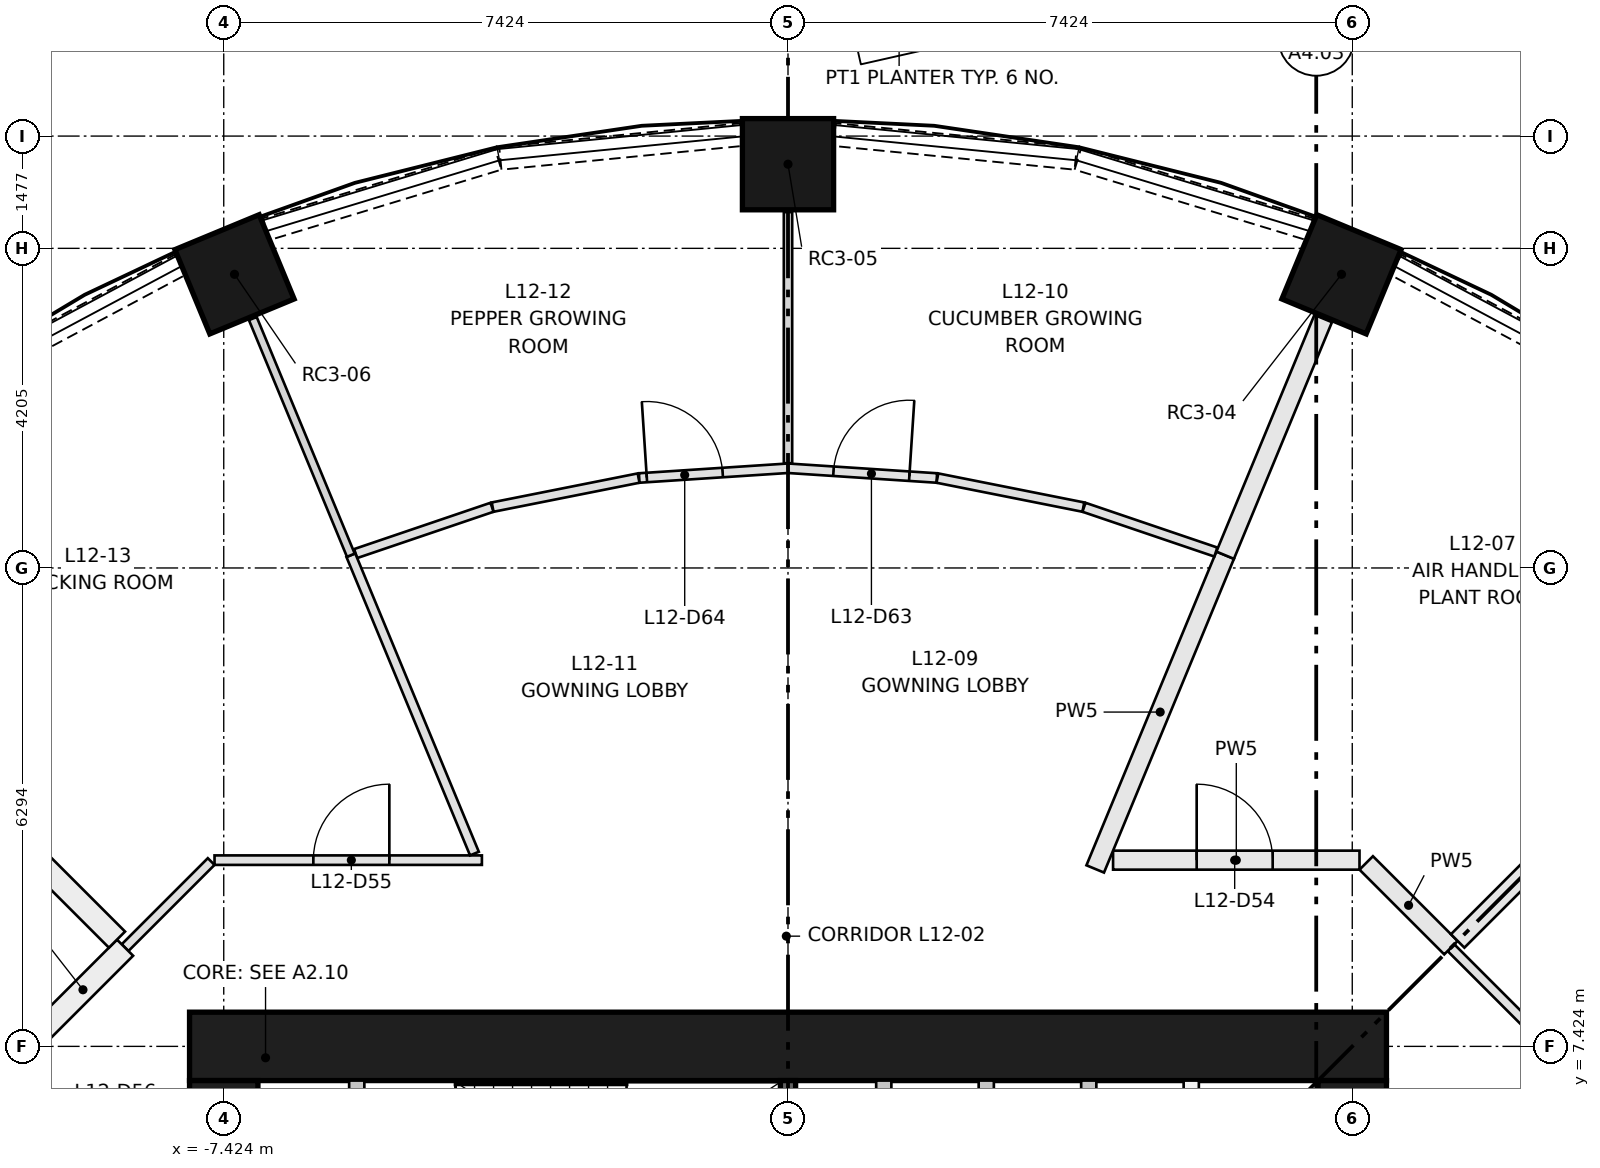
"""IFC4 building model, lengths in metres.
Left out: names, types, materials, properties, quantities, classifications, styles, units other than length and angle.
Written with IfcOpenShell. Run it as: python <this file> out.ifc"""

import sys

from ifc_helpers import new_model, si_unit, direction, frame, frame_2d, origin, origin_2d, place, context, subcontext, project, spatial, rectangle, extrude, element, fill, save


model = new_model("IFC4")
c1 = context("Model", 3, precision=1e-05, world=origin(), true_north=direction((0.0, 1.0)))
c2 = subcontext(c1, "Body", "Model", "MODEL_VIEW")
j1 = project(units=[si_unit("LENGTHUNIT", "METRE"), si_unit("PLANEANGLEUNIT", "RADIAN")], contexts=[c1])
p1 = place(None, origin())
s1 = spatial("IfcSite", under=j1, at=p1, CompositionType="ELEMENT")
p2 = place(p1, origin())
s2 = spatial("IfcBuilding", under=s1, at=p2, CompositionType="ELEMENT")
p3 = place(p2, frame((0.0, 0.0, 48.1)))
s3 = spatial("IfcBuildingStorey", under=s2, at=p3, CompositionType="ELEMENT", Elevation=48.1)
for number, where, z_axis, x_axis in (
    (1, (7.282, 17.582, 0.0), (0.0, 0.0, 1.0), (0.383, 0.924, 0.0)),
    (2, (0.0, 19.03, 0.0), (0.0, 0.0, 1.0), (0.0, 1.0, 0.0)),
    (3, (-7.282, 17.582, 0.0), (0.0, 0.0, 1.0), (-0.383, 0.924, 0.0)),
):
    element("IfcColumn", number, at=place(p3, frame(where, z_axis=z_axis, x_axis=x_axis)), inside=s3, PredefinedType="COLUMN", context=c2, shape_type="SweptSolid", body=[
        extrude(rectangle(XDim=1.2, YDim=1.2, at=origin_2d()), origin(), (0.0, 0.0, 1.0), 3.65),
    ])
p4 = place(p3, frame((-7.874, 7.424, 0.0), z_axis=(0.0, 0.0, 1.0), x_axis=(1.0, 0.0, 0.0)))
e4 = element("IfcWall", 4, at=p4, inside=s3, PredefinedType="SHEAR", context=c2, shape_type="SweptSolid", body=[
    extrude(rectangle(XDim=15.748, YDim=0.9, at=frame_2d((7.874, 0.0))), origin(), (0.0, 0.0, 1.0), 3.65),
])
p5 = place(p3, frame((-7.424, -6.974, 0.0), z_axis=(0.0, 0.0, 1.0), x_axis=(0.0, 1.0, 0.0)))
e5 = element("IfcWall", 5, at=p5, inside=s3, PredefinedType="SHEAR", context=c2, shape_type="SweptSolid", body=[
    extrude(rectangle(XDim=13.948, YDim=0.9, at=frame_2d((6.974, 0.0))), origin(), (0.0, 0.0, 1.0), 3.65),
])
p6 = place(p5, frame((6.474, 0.0, 0.0)))
e6 = element("IfcOpeningElement", 6, at=p6, cuts=e5, PredefinedType="OPENING", context=c2, shape_type="SweptSolid", body=[
    extrude(rectangle(XDim=1.0, YDim=2.1, at=frame_2d((0.5, 1.05))), frame((0.0, 0.46, 0.0), z_axis=(0.0, -1.0, 0.0), x_axis=(1.0, 0.0, 0.0)), (0.0, 0.0, 1.0), 0.92),
])
p7 = place(p5, frame((3.35, 0.0, 0.0)))
e7 = element("IfcOpeningElement", 7, at=p7, cuts=e5, PredefinedType="OPENING", context=c2, shape_type="SweptSolid", body=[
    extrude(rectangle(XDim=1.8, YDim=2.1, at=frame_2d((0.9, 1.05))), frame((0.0, 0.46, 0.0), z_axis=(0.0, -1.0, 0.0), x_axis=(1.0, 0.0, 0.0)), (0.0, 0.0, 1.0), 0.92),
])
p8 = place(p5, frame((8.799, 0.0, 0.0)))
e8 = element("IfcOpeningElement", 8, at=p8, cuts=e5, PredefinedType="OPENING", context=c2, shape_type="SweptSolid", body=[
    extrude(rectangle(XDim=1.8, YDim=2.1, at=frame_2d((0.9, 1.05))), frame((0.0, 0.46, 0.0), z_axis=(0.0, -1.0, 0.0), x_axis=(1.0, 0.0, 0.0)), (0.0, 0.0, 1.0), 0.92),
])
p9 = place(p5, frame((11.974, 0.0, 0.0)))
e9 = element("IfcOpeningElement", 9, at=p9, cuts=e5, PredefinedType="OPENING", context=c2, shape_type="SweptSolid", body=[
    extrude(rectangle(XDim=1.0, YDim=2.1, at=frame_2d((0.5, 1.05))), frame((0.0, 0.46, 0.0), z_axis=(0.0, -1.0, 0.0), x_axis=(1.0, 0.0, 0.0)), (0.0, 0.0, 1.0), 0.92),
])
p10 = place(p3, frame((7.424, -6.974, 0.0), z_axis=(0.0, 0.0, 1.0), x_axis=(0.0, 1.0, 0.0)))
e10 = element("IfcWall", 10, at=p10, inside=s3, PredefinedType="SHEAR", context=c2, shape_type="SweptSolid", body=[
    extrude(rectangle(XDim=13.948, YDim=0.9, at=frame_2d((6.974, 0.0))), origin(), (0.0, 0.0, 1.0), 3.65),
])
p11 = place(p10, frame((6.474, 0.0, 0.0)))
e11 = element("IfcOpeningElement", 11, at=p11, cuts=e10, PredefinedType="OPENING", context=c2, shape_type="SweptSolid", body=[
    extrude(rectangle(XDim=1.0, YDim=2.1, at=frame_2d((0.5, 1.05))), frame((0.0, 0.46, 0.0), z_axis=(0.0, -1.0, 0.0), x_axis=(1.0, 0.0, 0.0)), (0.0, 0.0, 1.0), 0.92),
])
p12 = place(p10, frame((3.35, 0.0, 0.0)))
e12 = element("IfcOpeningElement", 12, at=p12, cuts=e10, PredefinedType="OPENING", context=c2, shape_type="SweptSolid", body=[
    extrude(rectangle(XDim=1.8, YDim=2.1, at=frame_2d((0.9, 1.05))), frame((0.0, 0.46, 0.0), z_axis=(0.0, -1.0, 0.0), x_axis=(1.0, 0.0, 0.0)), (0.0, 0.0, 1.0), 0.92),
])
p13 = place(p10, frame((8.799, 0.0, 0.0)))
e13 = element("IfcOpeningElement", 13, at=p13, cuts=e10, PredefinedType="OPENING", context=c2, shape_type="SweptSolid", body=[
    extrude(rectangle(XDim=1.8, YDim=2.1, at=frame_2d((0.9, 1.05))), frame((0.0, 0.46, 0.0), z_axis=(0.0, -1.0, 0.0), x_axis=(1.0, 0.0, 0.0)), (0.0, 0.0, 1.0), 0.92),
])
p14 = place(p3, frame((0.0, 5.574, 0.0), z_axis=(0.0, 0.0, 1.0), x_axis=(0.0, 1.0, 0.0)))
e14 = element("IfcWall", 14, at=p14, inside=s3, PredefinedType="SHEAR", context=c2, shape_type="SweptSolid", body=[
    extrude(rectangle(XDim=1.4, YDim=0.2, at=frame_2d((0.7, 0.0))), origin(), (0.0, 0.0, 1.0), 3.3),
])
for number, where, z_axis, x_axis in (
    (15, (1.26, 4.174, 0.0), (0.0, 0.0, 1.0), (0.0, 1.0, 0.0)),
    (16, (2.609, 4.174, 0.0), (0.0, 0.0, 1.0), (0.0, 1.0, 0.0)),
    (17, (3.957, 4.174, 0.0), (0.0, 0.0, 1.0), (0.0, 1.0, 0.0)),
    (18, (5.305, 4.174, 0.0), (0.0, 0.0, 1.0), (0.0, 1.0, 0.0)),
):
    element("IfcWall", number, at=place(p3, frame(where, z_axis=z_axis, x_axis=x_axis)), inside=s3, PredefinedType="PARTITIONING", context=c2, shape_type="SweptSolid", body=[
        extrude(rectangle(XDim=2.8, YDim=0.2, at=frame_2d((1.4, 0.0))), origin(), (0.0, 0.0, 1.0), 3.3),
    ])
p15 = place(p3, frame((-5.674, 4.174, 0.0), z_axis=(0.0, 0.0, 1.0), x_axis=(0.0, 1.0, 0.0)))
e19 = element("IfcWall", 19, at=p15, inside=s3, PredefinedType="PARTITIONING", context=c2, shape_type="SweptSolid", body=[
    extrude(rectangle(XDim=2.8, YDim=0.2, at=frame_2d((1.4, 0.0))), origin(), (0.0, 0.0, 1.0), 3.3),
])
p16 = place(p15, frame((0.125, 0.0, 0.0)))
e20 = element("IfcOpeningElement", 20, at=p16, cuts=e19, PredefinedType="OPENING", context=c2, shape_type="SweptSolid", body=[
    extrude(rectangle(XDim=0.95, YDim=2.1, at=frame_2d((0.475, 1.05))), frame((0.0, 0.11, 0.0), z_axis=(0.0, -1.0, 0.0), x_axis=(1.0, 0.0, 0.0)), (0.0, 0.0, 1.0), 0.22),
])
p17 = place(p15, frame((1.725, 0.0, 0.0)))
e21 = element("IfcOpeningElement", 21, at=p17, cuts=e19, PredefinedType="OPENING", context=c2, shape_type="SweptSolid", body=[
    extrude(rectangle(XDim=0.95, YDim=2.1, at=frame_2d((0.475, 1.05))), frame((0.0, 0.11, 0.0), z_axis=(0.0, -1.0, 0.0), x_axis=(1.0, 0.0, 0.0)), (0.0, 0.0, 1.0), 0.22),
])
p18 = place(p3, frame((10.809, 16.204, 0.0), z_axis=(0.0, 0.0, 1.0), x_axis=(-0.881994263934, 0.471260138764, 0.0)))
e22 = element("IfcWall", 22, at=p18, inside=s3, PredefinedType="SOLIDWALL", context=c2, shape_type="SweptSolid", body=[
    extrude(rectangle(XDim=3.187, YDim=0.3, at=frame_2d((1.593, 0.0))), origin(), (0.0, 0.0, 1.0), 0.9),
])
p19 = place(p3, frame((6.865, 18.175, 0.0), z_axis=(0.0, 0.0, 1.0), x_axis=(-0.956849017819, 0.290585541792, 0.0)))
e23 = element("IfcWall", 23, at=p19, inside=s3, PredefinedType="SOLIDWALL", context=c2, shape_type="SweptSolid", body=[
    extrude(rectangle(XDim=3.188, YDim=0.3, at=frame_2d((1.594, 0.0))), origin(), (0.0, 0.0, 1.0), 0.9),
])
for number, where, z_axis, x_axis in (
    (24, (3.785, 19.107, 0.0), (0.0, 0.0, 1.0), (-0.995, 0.098, 0.0)),
    (25, (-0.613, 19.419, 0.0), (0.0, 0.0, 1.0), (-0.995, -0.098, 0.0)),
):
    element("IfcWall", number, at=place(p3, frame(where, z_axis=z_axis, x_axis=x_axis)), inside=s3, PredefinedType="SOLIDWALL", context=c2, shape_type="SweptSolid", body=[
        extrude(rectangle(XDim=3.188, YDim=0.3, at=frame_2d((1.594, 0.0))), origin(), (0.0, 0.0, 1.0), 0.9),
    ])
p20 = place(p3, frame((-3.814, 19.102, 0.0), z_axis=(0.0, 0.0, 1.0), x_axis=(-0.956849017819, -0.290585541792, 0.0)))
e26 = element("IfcWall", 26, at=p20, inside=s3, PredefinedType="SOLIDWALL", context=c2, shape_type="SweptSolid", body=[
    extrude(rectangle(XDim=3.188, YDim=0.3, at=frame_2d((1.594, 0.0))), origin(), (0.0, 0.0, 1.0), 0.9),
])
p21 = place(p3, frame((-7.998, 17.706, 0.0), z_axis=(0.0, 0.0, 1.0), x_axis=(-0.881994263934, -0.471260138764, 0.0)))
e27 = element("IfcWall", 27, at=p21, inside=s3, PredefinedType="SOLIDWALL", context=c2, shape_type="SweptSolid", body=[
    extrude(rectangle(XDim=3.187, YDim=0.3, at=frame_2d((1.593, 0.0))), origin(), (0.0, 0.0, 1.0), 0.9),
])
p22 = place(p3, frame((8.722, 8.722, 0.0), z_axis=(0.0, 0.0, 1.0), x_axis=(0.70718294931, -0.707030604857, 0.0)))
e28 = element("IfcWall", 28, at=p22, inside=s3, PredefinedType="PARTITIONING", context=c2, shape_type="SweptSolid", body=[
    extrude(rectangle(XDim=1.603, YDim=0.125, at=frame_2d((0.801, 0.0))), origin(), (0.0, 0.0, 1.0), 3.3),
])
p23 = place(p3, frame((4.277, 9.874, 0.0), z_axis=(0.0, 0.0, 1.0), x_axis=(1.0, 0.0, 0.0)))
e29 = element("IfcWall", 29, at=p23, inside=s3, PredefinedType="PARTITIONING", context=c2, shape_type="SweptSolid", body=[
    extrude(rectangle(XDim=3.242, YDim=0.25, at=frame_2d((1.621, 0.0))), origin(), (0.0, 0.0, 1.0), 3.3),
])
p24 = place(p23, frame((1.1, 0.0, 0.0)))
e30 = element("IfcOpeningElement", 30, at=p24, cuts=e29, PredefinedType="OPENING", context=c2, shape_type="SweptSolid", body=[
    extrude(rectangle(XDim=1.0, YDim=2.1, at=frame_2d((0.5, 1.05))), frame((0.0, 0.135, 0.0), z_axis=(0.0, -1.0, 0.0), x_axis=(1.0, 0.0, 0.0)), (0.0, 0.0, 1.0), 0.27),
])
p25 = place(p3, frame((7.608, 9.837, 0.0), z_axis=(0.0, 0.0, 1.0), x_axis=(0.707029353672, -0.707184200224, 0.0)))
e31 = element("IfcWall", 31, at=p25, inside=s3, PredefinedType="PARTITIONING", context=c2, shape_type="SweptSolid", body=[
    extrude(rectangle(XDim=1.577, YDim=0.25, at=frame_2d((0.788, 0.0))), origin(), (0.0, 0.0, 1.0), 3.3),
])
p26 = place(p3, frame((-8.722, 8.722, 0.0), z_axis=(0.0, 0.0, 1.0), x_axis=(0.707030604857, 0.70718294931, 0.0)))
e32 = element("IfcWall", 32, at=p26, inside=s3, PredefinedType="PARTITIONING", context=c2, shape_type="SweptSolid", body=[
    extrude(rectangle(XDim=1.603, YDim=0.125, at=frame_2d((0.801, 0.0))), origin(), (0.0, 0.0, 1.0), 3.3),
])
p27 = place(p3, frame((-7.545, 9.874, 0.0), z_axis=(0.0, 0.0, 1.0), x_axis=(1.0, 0.0, 0.0)))
e33 = element("IfcWall", 33, at=p27, inside=s3, PredefinedType="PARTITIONING", context=c2, shape_type="SweptSolid", body=[
    extrude(rectangle(XDim=3.518, YDim=0.125, at=frame_2d((1.759, 0.0))), origin(), (0.0, 0.0, 1.0), 3.3),
])
p28 = place(p27, frame((1.3, 0.0, 0.0)))
e34 = element("IfcOpeningElement", 34, at=p28, cuts=e33, PredefinedType="OPENING", context=c2, shape_type="SweptSolid", body=[
    extrude(rectangle(XDim=1.0, YDim=2.1, at=frame_2d((0.5, 1.05))), frame((0.0, 0.073, 0.0), z_axis=(0.0, -1.0, 0.0), x_axis=(1.0, 0.0, 0.0)), (0.0, 0.0, 1.0), 0.145),
])
p29 = place(p3, frame((-9.83, 7.615, 0.0), z_axis=(0.0, 0.0, 1.0), x_axis=(0.70718471217, 0.707028841614, 0.0)))
e35 = element("IfcWall", 35, at=p29, inside=s3, PredefinedType="PARTITIONING", context=c2, shape_type="SweptSolid", body=[
    extrude(rectangle(XDim=1.566, YDim=0.3, at=frame_2d((0.783, 0.0))), origin(), (0.0, 0.0, 1.0), 3.3),
])
p30 = place(p3, frame((13.011, 13.011, 0.0), z_axis=(0.0, 0.0, 1.0), x_axis=(-0.707106781187, -0.707106781187, 0.0)))
e36 = element("IfcWall", 36, at=p30, inside=s3, PredefinedType="PARTITIONING", context=c2, shape_type="SweptSolid", body=[
    extrude(rectangle(XDim=5.94, YDim=0.25, at=frame_2d((2.97, 0.0))), origin(), (0.0, 0.0, 1.0), 3.3),
])
p31 = place(p3, frame((4.042, 9.759, 0.0), z_axis=(0.0, 0.0, 1.0), x_axis=(0.382697682956, 0.923873629595, 0.0)))
e37 = element("IfcWall", 37, at=p31, inside=s3, PredefinedType="PARTITIONING", context=c2, shape_type="SweptSolid", body=[
    extrude(rectangle(XDim=4.468, YDim=0.25, at=frame_2d((2.234, 0.0))), origin(), (0.0, 0.0, 1.0), 3.3),
])
p32 = place(p3, frame((5.752, 13.886, 0.0), z_axis=(0.0, 0.0, 1.0), x_axis=(0.382716478617, 0.923865843613, 0.0)))
e38 = element("IfcWall", 38, at=p32, inside=s3, PredefinedType="PARTITIONING", context=c2, shape_type="SweptSolid", body=[
    extrude(rectangle(XDim=3.37, YDim=0.25, at=frame_2d((1.685, 0.0))), origin(), (0.0, 0.0, 1.0), 3.3),
])
p33 = place(p3, frame((0.0, 15.03, 0.0), z_axis=(0.0, 0.0, 1.0), x_axis=(0.997855616904, -0.065453554619, 0.0)))
e39 = element("IfcWall", 39, at=p33, inside=s3, PredefinedType="PARTITIONING", context=c2, shape_type="SweptSolid", body=[
    extrude(rectangle(XDim=1.962, YDim=0.125, at=frame_2d((0.981, 0.0))), origin(), (0.0, 0.0, 1.0), 3.3),
])
p34 = place(p33, frame((0.6, 0.0, 0.0)))
e40 = element("IfcOpeningElement", 40, at=p34, cuts=e39, PredefinedType="OPENING", context=c2, shape_type="SweptSolid", body=[
    extrude(rectangle(XDim=1.0, YDim=2.1, at=frame_2d((0.5, 1.05))), frame((0.0, 0.073, 0.0), z_axis=(0.0, -1.0, 0.0), x_axis=(1.0, 0.0, 0.0)), (0.0, 0.0, 1.0), 0.145),
])
p35 = place(p3, frame((1.966, 14.901, 0.0), z_axis=(0.0, 0.0, 1.0), x_axis=(0.980795915473, -0.19503684829, 0.0)))
e41 = element("IfcWall", 41, at=p35, inside=s3, PredefinedType="PARTITIONING", context=c2, shape_type="SweptSolid", body=[
    extrude(rectangle(XDim=1.958, YDim=0.125, at=frame_2d((0.979, 0.0))), origin(), (0.0, 0.0, 1.0), 3.3),
])
p36 = place(p3, frame((3.894, 14.517, 0.0), z_axis=(0.0, 0.0, 1.0), x_axis=(0.946909907848, -0.321499030201, 0.0)))
e42 = element("IfcWall", 42, at=p36, inside=s3, PredefinedType="PARTITIONING", context=c2, shape_type="SweptSolid", body=[
    extrude(rectangle(XDim=1.832, YDim=0.125, at=frame_2d((0.916, 0.0))), origin(), (0.0, 0.0, 1.0), 3.3),
])
p37 = place(p3, frame((0.0, 15.096, 0.0), z_axis=(0.0, 0.0, 1.0), x_axis=(0.0, 1.0, 0.0)))
e43 = element("IfcWall", 43, at=p37, inside=s3, PredefinedType="PARTITIONING", context=c2, shape_type="SweptSolid", body=[
    extrude(rectangle(XDim=3.304, YDim=0.11, at=frame_2d((1.652, 0.0))), origin(), (0.0, 0.0, 1.0), 3.3),
])
p38 = place(p3, frame((-5.688, 13.907, 0.0), z_axis=(0.0, 0.0, 1.0), x_axis=(0.946929690395, 0.321440758848, 0.0)))
e44 = element("IfcWall", 44, at=p38, inside=s3, PredefinedType="PARTITIONING", context=c2, shape_type="SweptSolid", body=[
    extrude(rectangle(XDim=1.895, YDim=0.125, at=frame_2d((0.948, 0.0))), origin(), (0.0, 0.0, 1.0), 3.3),
])
p39 = place(p3, frame((-3.886, 14.519, 0.0), z_axis=(0.0, 0.0, 1.0), x_axis=(0.980795915473, 0.19503684829, 0.0)))
e45 = element("IfcWall", 45, at=p39, inside=s3, PredefinedType="PARTITIONING", context=c2, shape_type="SweptSolid", body=[
    extrude(rectangle(XDim=1.958, YDim=0.125, at=frame_2d((0.979, 0.0))), origin(), (0.0, 0.0, 1.0), 3.3),
])
p40 = place(p3, frame((-1.958, 14.902, 0.0), z_axis=(0.0, 0.0, 1.0), x_axis=(0.997855616904, 0.065453554619, 0.0)))
e46 = element("IfcWall", 46, at=p40, inside=s3, PredefinedType="PARTITIONING", context=c2, shape_type="SweptSolid", body=[
    extrude(rectangle(XDim=1.962, YDim=0.125, at=frame_2d((0.981, 0.0))), origin(), (0.0, 0.0, 1.0), 3.3),
])
p41 = place(p40, frame((0.1, 0.0, 0.0)))
e47 = element("IfcOpeningElement", 47, at=p41, cuts=e46, PredefinedType="OPENING", context=c2, shape_type="SweptSolid", body=[
    extrude(rectangle(XDim=1.0, YDim=2.1, at=frame_2d((0.5, 1.05))), frame((0.0, 0.073, 0.0), z_axis=(0.0, -1.0, 0.0), x_axis=(1.0, 0.0, 0.0)), (0.0, 0.0, 1.0), 0.145),
])
p42 = place(p3, frame((-4.126, 9.96, 0.0), z_axis=(0.0, 0.0, 1.0), x_axis=(-0.382676572561, 0.923882373905, 0.0)))
e48 = element("IfcWall", 48, at=p42, inside=s3, PredefinedType="PARTITIONING", context=c2, shape_type="SweptSolid", body=[
    extrude(rectangle(XDim=4.249, YDim=0.125, at=frame_2d((2.125, 0.0))), origin(), (0.0, 0.0, 1.0), 3.3),
])
p43 = place(p3, frame((-5.752, 13.886, 0.0), z_axis=(0.0, 0.0, 1.0), x_axis=(-0.382716478617, 0.923865843613, 0.0)))
e49 = element("IfcWall", 49, at=p43, inside=s3, PredefinedType="PARTITIONING", context=c2, shape_type="SweptSolid", body=[
    extrude(rectangle(XDim=3.37, YDim=0.11, at=frame_2d((1.685, 0.0))), origin(), (0.0, 0.0, 1.0), 3.3),
])
p44 = place(p3, frame((-8.829, 8.829, 0.0), z_axis=(0.0, 0.0, 1.0), x_axis=(-0.707106781187, 0.707106781187, 0.0)))
e50 = element("IfcWall", 50, at=p44, inside=s3, PredefinedType="PARTITIONING", context=c2, shape_type="SweptSolid", body=[
    extrude(rectangle(XDim=5.914, YDim=0.3, at=frame_2d((2.957, 0.0))), origin(), (0.0, 0.0, 1.0), 3.3),
])
p45 = place(p24, origin())
e51 = element("IfcDoor", 51, at=p45, inside=s3, OperationType="SINGLE_SWING_LEFT", PredefinedType="DOOR", context=c2, shape_type="SweptSolid", body=[
    extrude(rectangle(XDim=1.0, YDim=2.1, at=frame_2d((0.5, 1.05))), frame((0.0, 0.025, 0.0), z_axis=(0.0, -1.0, 0.0), x_axis=(1.0, 0.0, 0.0)), (0.0, 0.0, 1.0), 0.05),
])
fill(e30, e51)
p46 = place(p28, origin())
e52 = element("IfcDoor", 52, at=p46, inside=s3, OperationType="SINGLE_SWING_RIGHT", PredefinedType="DOOR", context=c2, shape_type="SweptSolid", body=[
    extrude(rectangle(XDim=1.0, YDim=2.1, at=frame_2d((0.5, 1.05))), frame((0.0, 0.025, 0.0), z_axis=(0.0, -1.0, 0.0), x_axis=(1.0, 0.0, 0.0)), (0.0, 0.0, 1.0), 0.05),
])
fill(e34, e52)
p47 = place(p34, origin())
e53 = element("IfcDoor", 53, at=p47, inside=s3, OperationType="SINGLE_SWING_RIGHT", PredefinedType="DOOR", context=c2, shape_type="SweptSolid", body=[
    extrude(rectangle(XDim=1.0, YDim=2.1, at=frame_2d((0.5, 1.05))), frame((0.0, 0.025, 0.0), z_axis=(0.0, -1.0, 0.0), x_axis=(1.0, 0.0, 0.0)), (0.0, 0.0, 1.0), 0.05),
])
fill(e40, e53)
p48 = place(p41, origin())
e54 = element("IfcDoor", 54, at=p48, inside=s3, OperationType="SINGLE_SWING_LEFT", PredefinedType="DOOR", context=c2, shape_type="SweptSolid", body=[
    extrude(rectangle(XDim=1.0, YDim=2.1, at=frame_2d((0.5, 1.05))), frame((0.0, 0.025, 0.0), z_axis=(0.0, -1.0, 0.0), x_axis=(1.0, 0.0, 0.0)), (0.0, 0.0, 1.0), 0.05),
])
fill(e47, e54)
save(model, sys.argv[1])
